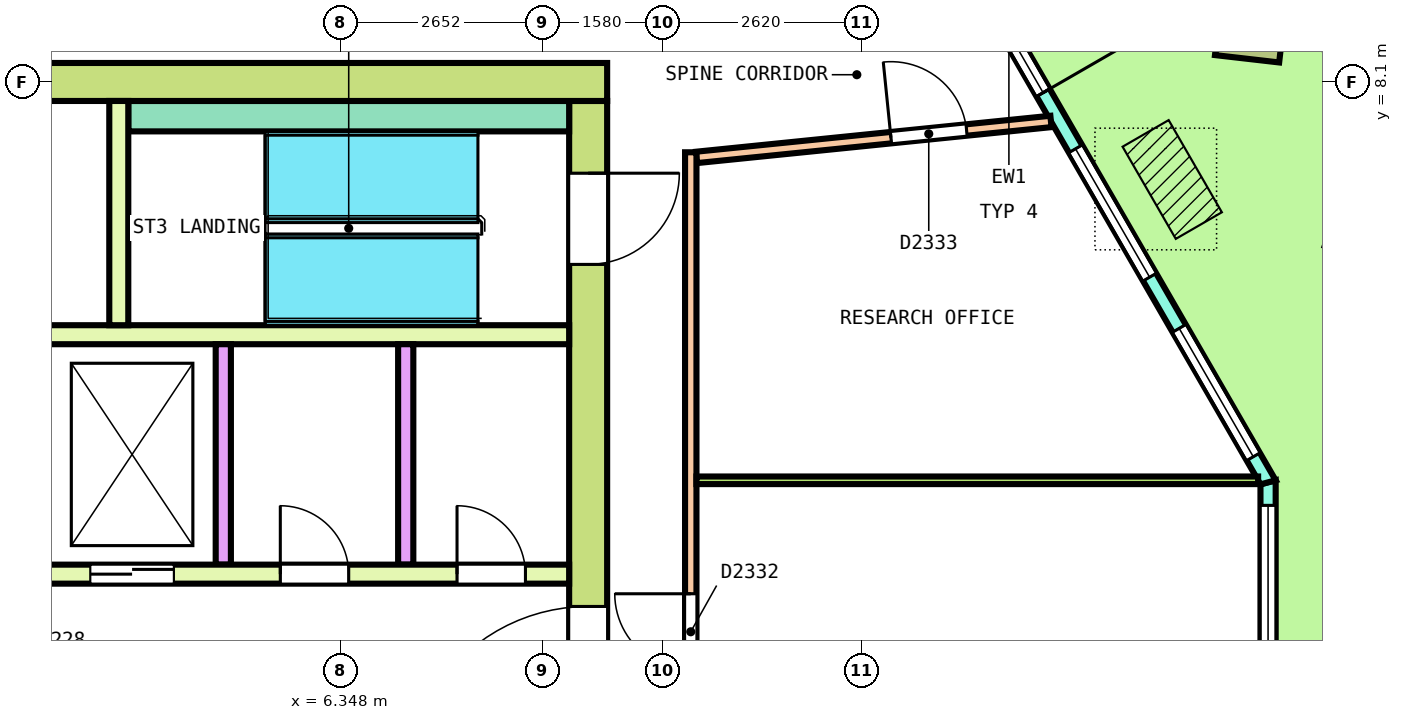
"""IFC4 building model, lengths in metres.
Left out: names, types, materials, properties, quantities, classifications, styles, units other than length and angle.
Written with IfcOpenShell. Run it as: python <this file> out.ifc"""

import sys

from ifc_helpers import new_model, si_unit, direction, frame, frame_2d, origin, origin_2d, place, context, subcontext, project, spatial, polyline, rectangle, outline, extrude, element, fill, save


model = new_model("IFC4")
c1 = context("Model", 3, precision=1e-05, world=origin(), true_north=direction((0.0, 1.0)))
c2 = subcontext(c1, "Body", "Model", "MODEL_VIEW")
j1 = project(units=[si_unit("LENGTHUNIT", "METRE"), si_unit("PLANEANGLEUNIT", "RADIAN")], contexts=[c1])
p1 = place(None, origin())
s1 = spatial("IfcSite", under=j1, at=p1, CompositionType="ELEMENT")
p2 = place(p1, origin())
s2 = spatial("IfcBuilding", under=s1, at=p2, CompositionType="ELEMENT")
p3 = place(p2, frame((0.0, 0.0, 320.6)))
s3 = spatial("IfcBuildingStorey", under=s2, at=p3, CompositionType="ELEMENT", Elevation=320.6)
p4 = place(p3, frame((19.831, 6.205, 0.0), z_axis=(0.021793949015, 0.025136579231, 0.999446434868), x_axis=(-0.499665408411, 0.866150057728, -0.010888394553)))
e1 = element("IfcColumn", 1, at=p4, inside=s3, PredefinedType="COLUMN", context=c2, shape_type="SweptSolid", body=[
    extrude(rectangle(XDim=0.85, YDim=0.85, at=origin_2d()), origin(), (0.0, 0.0, 1.0), 3.652),
])
p5 = place(p3, frame((18.317, 8.827, 0.0), z_axis=(0.025405336763, 0.018853434124, 0.999499433159), x_axis=(-0.500491745159, 0.865733787207, -0.003608699989)))
e2 = element("IfcColumn", 2, at=p5, inside=s3, PredefinedType="COLUMN", context=c2, shape_type="SweptSolid", body=[
    extrude(rectangle(XDim=0.85, YDim=0.85, at=origin_2d()), origin(), (0.0, 0.0, 1.0), 3.652),
])
p6 = place(p3, frame((18.545, -2.079, 0.0), z_axis=(0.0, 0.0, 1.0), x_axis=(0.0, 1.0, 0.0)))
e3 = element("IfcWall", 3, at=p6, inside=s3, PredefinedType="SOLIDWALL", context=c2, shape_type="SweptSolid", body=[
    extrude(outline(polyline([(-0.027, -0.1), (1.214, -0.1), (2.456, -0.1), (3.697, -0.1), (4.938, -0.1), (4.885, 0.1), (3.67, 0.1), (2.456, 0.1), (1.241, 0.1), (0.027, 0.1), (-0.027, -0.1)])), origin(), (0.0, 0.0, 1.0), 3.7),
])
p7 = place(p6, frame((0.303, 0.0, 0.1)))
e4 = element("IfcOpeningElement", 4, at=p7, cuts=e3, PredefinedType="OPENING", context=c2, shape_type="SweptSolid", body=[
    extrude(rectangle(XDim=1.85, YDim=2.9, at=frame_2d((0.925, 1.45))), frame((0.0, 0.11, 0.0), z_axis=(0.0, -1.0, 0.0), x_axis=(1.0, 0.0, 0.0)), (0.0, 0.0, 1.0), 0.22),
])
p8 = place(p6, frame((2.759, 0.0, 0.1)))
e5 = element("IfcOpeningElement", 5, at=p8, cuts=e3, PredefinedType="OPENING", context=c2, shape_type="SweptSolid", body=[
    extrude(rectangle(XDim=1.85, YDim=2.9, at=frame_2d((0.925, 1.45))), frame((0.0, 0.11, 0.0), z_axis=(0.0, -1.0, 0.0), x_axis=(1.0, 0.0, 0.0)), (0.0, 0.0, 1.0), 0.22),
])
p9 = place(p3, frame((18.545, 2.833, 0.0), z_axis=(0.0, 0.0, 1.0), x_axis=(-0.49999155959, 0.866030276803, 0.0)))
e6 = element("IfcWall", 6, at=p9, inside=s3, PredefinedType="SOLIDWALL", context=c2, shape_type="SweptSolid", body=[
    extrude(outline(polyline([(-0.027, -0.1), (1.026, -0.1), (2.08, -0.1), (3.133, -0.1), (4.186, -0.1), (5.239, -0.1), (6.292, -0.1), (7.346, -0.1), (8.399, -0.1), (9.452, -0.1), (10.506, -0.1), (11.559, -0.1), (12.612, -0.1), (13.665, -0.1), (13.612, 0.1), (12.567, 0.1), (11.522, 0.1), (10.477, 0.1), (9.432, 0.1), (8.387, 0.1), (7.342, 0.1), (6.297, 0.1), (5.252, 0.1), (4.207, 0.1), (3.162, 0.1), (2.117, 0.1), (1.072, 0.1), (0.027, 0.1), (-0.027, -0.1)])), origin(), (0.0, 0.0, 1.0), 3.7),
])
p10 = place(p9, frame((0.389, 0.0, 0.1)))
e7 = element("IfcOpeningElement", 7, at=p10, cuts=e6, PredefinedType="OPENING", context=c2, shape_type="SweptSolid", body=[
    extrude(rectangle(XDim=1.95, YDim=2.9, at=frame_2d((0.975, 1.45))), frame((0.0, 0.11, 0.0), z_axis=(0.0, -1.0, 0.0), x_axis=(1.0, 0.0, 0.0)), (0.0, 0.0, 1.0), 0.22),
])
p11 = place(p9, frame((3.116, 0.0, 0.1)))
e8 = element("IfcOpeningElement", 8, at=p11, cuts=e6, PredefinedType="OPENING", context=c2, shape_type="SweptSolid", body=[
    extrude(rectangle(XDim=1.95, YDim=2.9, at=frame_2d((0.975, 1.45))), frame((0.0, 0.11, 0.0), z_axis=(0.0, -1.0, 0.0), x_axis=(1.0, 0.0, 0.0)), (0.0, 0.0, 1.0), 0.22),
])
p12 = place(p9, frame((5.919, 0.0, 0.0)))
e9 = element("IfcOpeningElement", 9, at=p12, cuts=e6, PredefinedType="OPENING", context=c2, shape_type="SweptSolid", body=[
    extrude(rectangle(XDim=1.8, YDim=2.4, at=frame_2d((0.9, 1.2))), frame((0.0, 0.11, 0.0), z_axis=(0.0, -1.0, 0.0), x_axis=(1.0, 0.0, 0.0)), (0.0, 0.0, 1.0), 0.22),
])
p13 = place(p9, frame((5.919, 0.0, 2.55)))
e10 = element("IfcOpeningElement", 10, at=p13, cuts=e6, PredefinedType="OPENING", context=c2, shape_type="SweptSolid", body=[
    extrude(rectangle(XDim=1.8, YDim=0.45, at=frame_2d((0.9, 0.225))), frame((0.0, 0.11, 0.0), z_axis=(0.0, -1.0, 0.0), x_axis=(1.0, 0.0, 0.0)), (0.0, 0.0, 1.0), 0.22),
])
p14 = place(p9, frame((8.572, 0.0, 0.1)))
e11 = element("IfcOpeningElement", 11, at=p14, cuts=e6, PredefinedType="OPENING", context=c2, shape_type="SweptSolid", body=[
    extrude(rectangle(XDim=1.95, YDim=2.9, at=frame_2d((0.975, 1.45))), frame((0.0, 0.11, 0.0), z_axis=(0.0, -1.0, 0.0), x_axis=(1.0, 0.0, 0.0)), (0.0, 0.0, 1.0), 0.22),
])
p15 = place(p9, frame((11.3, 0.0, 0.1)))
e12 = element("IfcOpeningElement", 12, at=p15, cuts=e6, PredefinedType="OPENING", context=c2, shape_type="SweptSolid", body=[
    extrude(rectangle(XDim=1.95, YDim=2.9, at=frame_2d((0.975, 1.45))), frame((0.0, 0.11, 0.0), z_axis=(0.0, -1.0, 0.0), x_axis=(1.0, 0.0, 0.0)), (0.0, 0.0, 1.0), 0.22),
])
p16 = place(p3, frame((-9.85, 8.1, 0.0), z_axis=(0.0, 0.0, 1.0), x_axis=(1.0, 0.0, 0.0)))
e13 = element("IfcWall", 13, at=p16, inside=s3, PredefinedType="SHEAR", context=c2, shape_type="SweptSolid", body=[
    extrude(rectangle(XDim=19.7, YDim=0.5, at=frame_2d((9.85, 0.0))), origin(), (0.0, 0.0, 1.0), 3.7),
])
p17 = place(p16, frame((10.775, 0.0, 0.0)))
e14 = element("IfcOpeningElement", 14, at=p17, cuts=e13, PredefinedType="OPENING", context=c2, shape_type="SweptSolid", body=[
    extrude(rectangle(XDim=1.4, YDim=2.1, at=frame_2d((0.7, 1.05))), frame((0.0, 0.26, 0.0), z_axis=(0.0, -1.0, 0.0), x_axis=(1.0, 0.0, 0.0)), (0.0, 0.0, 1.0), 0.52),
])
p18 = place(p3, frame((9.6, -7.85, 0.0), z_axis=(0.0, 0.0, 1.0), x_axis=(0.0, 1.0, 0.0)))
e15 = element("IfcWall", 15, at=p18, inside=s3, PredefinedType="SHEAR", context=c2, shape_type="SweptSolid", body=[
    extrude(rectangle(XDim=15.7, YDim=0.5, at=frame_2d((7.85, 0.0))), origin(), (0.0, 0.0, 1.0), 3.7),
])
p19 = place(p18, frame((6.65, 0.0, 0.0)))
e16 = element("IfcOpeningElement", 16, at=p19, cuts=e15, PredefinedType="OPENING", context=c2, shape_type="SweptSolid", body=[
    extrude(rectangle(XDim=2.4, YDim=2.1, at=frame_2d((1.2, 1.05))), frame((0.0, 0.26, 0.0), z_axis=(0.0, -1.0, 0.0), x_axis=(1.0, 0.0, 0.0)), (0.0, 0.0, 1.0), 0.52),
])
p20 = place(p18, frame((13.55, 0.0, 0.0)))
e17 = element("IfcOpeningElement", 17, at=p20, cuts=e15, PredefinedType="OPENING", context=c2, shape_type="SweptSolid", body=[
    extrude(rectangle(XDim=1.2, YDim=2.1, at=frame_2d((0.6, 1.05))), frame((0.0, 0.26, 0.0), z_axis=(0.0, -1.0, 0.0), x_axis=(1.0, 0.0, 0.0)), (0.0, 0.0, 1.0), 0.52),
])
p21 = place(p18, frame((1.05, 0.0, 0.0)))
e18 = element("IfcOpeningElement", 18, at=p21, cuts=e15, PredefinedType="OPENING", context=c2, shape_type="SweptSolid", body=[
    extrude(rectangle(XDim=1.0, YDim=2.1, at=frame_2d((0.5, 1.05))), frame((0.0, 0.26, 0.0), z_axis=(0.0, -1.0, 0.0), x_axis=(1.0, 0.0, 0.0)), (0.0, 0.0, 1.0), 0.52),
])
p22 = place(p3, frame((-9.35, 1.625, 0.0), z_axis=(0.0, 0.0, 1.0), x_axis=(1.0, 0.0, 0.0)))
e19 = element("IfcWall", 19, at=p22, inside=s3, PredefinedType="SOLIDWALL", context=c2, shape_type="SweptSolid", body=[
    extrude(rectangle(XDim=18.7, YDim=0.25, at=frame_2d((9.35, 0.0))), origin(), (0.0, 0.0, 1.0), 3.7),
])
p23 = place(p22, frame((7.65, 0.0, 0.0)))
e20 = element("IfcOpeningElement", 20, at=p23, cuts=e19, PredefinedType="OPENING", context=c2, shape_type="SweptSolid", body=[
    extrude(rectangle(XDim=1.1, YDim=2.1, at=frame_2d((0.55, 1.05))), frame((0.0, 0.135, 0.0), z_axis=(0.0, -1.0, 0.0), x_axis=(1.0, 0.0, 0.0)), (0.0, 0.0, 1.0), 0.27),
])
p24 = place(p22, frame((9.95, 0.0, 0.0)))
e21 = element("IfcOpeningElement", 21, at=p24, cuts=e19, PredefinedType="OPENING", context=c2, shape_type="SweptSolid", body=[
    extrude(rectangle(XDim=1.1, YDim=2.1, at=frame_2d((0.55, 1.05))), frame((0.0, 0.135, 0.0), z_axis=(0.0, -1.0, 0.0), x_axis=(1.0, 0.0, 0.0)), (0.0, 0.0, 1.0), 0.27),
])
p25 = place(p22, frame((12.4, 0.0, 0.0)))
e22 = element("IfcOpeningElement", 22, at=p25, cuts=e19, PredefinedType="OPENING", context=c2, shape_type="SweptSolid", body=[
    extrude(rectangle(XDim=1.1, YDim=2.1, at=frame_2d((0.55, 1.05))), frame((0.0, 0.135, 0.0), z_axis=(0.0, -1.0, 0.0), x_axis=(1.0, 0.0, 0.0)), (0.0, 0.0, 1.0), 0.27),
])
p26 = place(p22, frame((0.575, 0.0, 0.0)))
e23 = element("IfcOpeningElement", 23, at=p26, cuts=e19, PredefinedType="OPENING", context=c2, shape_type="SweptSolid", body=[
    extrude(rectangle(XDim=0.9, YDim=2.1, at=frame_2d((0.45, 1.05))), frame((0.0, 0.135, 0.0), z_axis=(0.0, -1.0, 0.0), x_axis=(1.0, 0.0, 0.0)), (0.0, 0.0, 1.0), 0.27),
])
p27 = place(p22, frame((2.919, 0.0, 0.0)))
e24 = element("IfcOpeningElement", 24, at=p27, cuts=e19, PredefinedType="OPENING", context=c2, shape_type="SweptSolid", body=[
    extrude(rectangle(XDim=0.9, YDim=2.1, at=frame_2d((0.45, 1.05))), frame((0.0, 0.135, 0.0), z_axis=(0.0, -1.0, 0.0), x_axis=(1.0, 0.0, 0.0)), (0.0, 0.0, 1.0), 0.27),
])
p28 = place(p22, frame((5.281, 0.0, 0.0)))
e25 = element("IfcOpeningElement", 25, at=p28, cuts=e19, PredefinedType="OPENING", context=c2, shape_type="SweptSolid", body=[
    extrude(rectangle(XDim=0.9, YDim=2.1, at=frame_2d((0.45, 1.05))), frame((0.0, 0.135, 0.0), z_axis=(0.0, -1.0, 0.0), x_axis=(1.0, 0.0, 0.0)), (0.0, 0.0, 1.0), 0.27),
])
p29 = place(p22, frame((14.9, 0.0, 0.0)))
e26 = element("IfcOpeningElement", 26, at=p29, cuts=e19, PredefinedType="OPENING", context=c2, shape_type="SweptSolid", body=[
    extrude(rectangle(XDim=0.9, YDim=2.1, at=frame_2d((0.45, 1.05))), frame((0.0, 0.135, 0.0), z_axis=(0.0, -1.0, 0.0), x_axis=(1.0, 0.0, 0.0)), (0.0, 0.0, 1.0), 0.27),
])
p30 = place(p22, frame((17.225, 0.0, 0.0)))
e27 = element("IfcOpeningElement", 27, at=p30, cuts=e19, PredefinedType="OPENING", context=c2, shape_type="SweptSolid", body=[
    extrude(rectangle(XDim=0.9, YDim=2.1, at=frame_2d((0.45, 1.05))), frame((0.0, 0.135, 0.0), z_axis=(0.0, -1.0, 0.0), x_axis=(1.0, 0.0, 0.0)), (0.0, 0.0, 1.0), 0.27),
])
p31 = place(p3, frame((-9.35, 4.775, 0.0), z_axis=(0.0, 0.0, 1.0), x_axis=(1.0, 0.0, 0.0)))
e28 = element("IfcWall", 28, at=p31, inside=s3, PredefinedType="SOLIDWALL", context=c2, shape_type="SweptSolid", body=[
    extrude(rectangle(XDim=18.7, YDim=0.25, at=frame_2d((9.35, 0.0))), origin(), (0.0, 0.0, 1.0), 3.7),
])
for number, where, z_axis, x_axis in (
    (29, (4.8, 1.75, 0.0), (0.0, 0.0, 1.0), (0.0, 1.0, 0.0)),
    (30, (7.2, 1.75, 0.0), (0.0, 0.0, 1.0), (0.0, 1.0, 0.0)),
):
    element("IfcWall", number, at=place(p3, frame(where, z_axis=z_axis, x_axis=x_axis)), inside=s3, PredefinedType="SOLIDWALL", context=c2, shape_type="SweptSolid", body=[
        extrude(rectangle(XDim=2.9, YDim=0.2, at=frame_2d((1.45, 0.0))), origin(), (0.0, 0.0, 1.0), 3.7),
    ])
p32 = place(p3, frame((3.55, 7.65, 0.0), z_axis=(0.0, 0.0, 1.0), x_axis=(1.0, 0.0, 0.0)))
e31 = element("IfcWall", 31, at=p32, inside=s3, PredefinedType="SOLIDWALL", context=c2, shape_type="SweptSolid", body=[
    extrude(rectangle(XDim=5.8, YDim=0.4, at=frame_2d((2.9, 0.0))), origin(), (0.0, 0.0, 1.0), 3.7),
])
p33 = place(p3, frame((3.425, 4.9, 0.0), z_axis=(0.0, 0.0, 1.0), x_axis=(0.0, 1.0, 0.0)))
e32 = element("IfcWall", 32, at=p33, inside=s3, PredefinedType="SOLIDWALL", context=c2, shape_type="SweptSolid", body=[
    extrude(rectangle(XDim=2.95, YDim=0.25, at=frame_2d((1.475, 0.0))), origin(), (0.0, 0.0, 1.0), 3.7),
])
p34 = place(p3, frame((11.025, 7.108, 0.0), z_axis=(0.0, 0.0, 1.0), x_axis=(0.99489386098, 0.100926732756, 0.0)))
e33 = element("IfcWall", 33, at=p34, inside=s3, PredefinedType="PARTITIONING", context=c2, shape_type="SweptSolid", body=[
    extrude(rectangle(XDim=4.688, YDim=0.15, at=frame_2d((2.344, 0.0))), origin(), (0.0, 0.0, 1.0), 3.05),
])
p35 = place(p34, frame((2.572, 0.0, 0.0)))
e34 = element("IfcOpeningElement", 34, at=p35, cuts=e33, PredefinedType="OPENING", context=c2, shape_type="SweptSolid", body=[
    extrude(rectangle(XDim=1.0, YDim=2.1, at=frame_2d((0.5, 1.05))), frame((0.0, 0.085, 0.0), z_axis=(0.0, -1.0, 0.0), x_axis=(1.0, 0.0, 0.0)), (0.0, 0.0, 1.0), 0.17),
])
p36 = place(p3, frame((10.95, -9.975, 0.0), z_axis=(0.0, 0.0, 1.0), x_axis=(0.0, 1.0, 0.0)))
e35 = element("IfcWall", 35, at=p36, inside=s3, PredefinedType="PARTITIONING", context=c2, shape_type="SweptSolid", body=[
    extrude(rectangle(XDim=17.15, YDim=0.15, at=frame_2d((8.575, 0.0))), origin(), (0.0, 0.0, 1.0), 3.05),
])
p37 = place(p36, frame((10.342, 0.0, 0.0)))
e36 = element("IfcOpeningElement", 36, at=p37, cuts=e35, PredefinedType="OPENING", context=c2, shape_type="SweptSolid", body=[
    extrude(rectangle(XDim=1.0, YDim=2.1, at=frame_2d((0.5, 1.05))), frame((0.0, 0.085, 0.0), z_axis=(0.0, -1.0, 0.0), x_axis=(1.0, 0.0, 0.0)), (0.0, 0.0, 1.0), 0.17),
])
p38 = place(p36, frame((3.01, 0.0, 0.0)))
e37 = element("IfcOpeningElement", 37, at=p38, cuts=e35, PredefinedType="OPENING", context=c2, shape_type="SweptSolid", body=[
    extrude(rectangle(XDim=1.0, YDim=2.1, at=frame_2d((0.5, 1.05))), frame((0.0, 0.085, 0.0), z_axis=(0.0, -1.0, 0.0), x_axis=(1.0, 0.0, 0.0)), (0.0, 0.0, 1.0), 0.17),
])
p39 = place(p36, frame((6.205, 0.0, 0.0)))
e38 = element("IfcOpeningElement", 38, at=p39, cuts=e35, PredefinedType="OPENING", context=c2, shape_type="SweptSolid", body=[
    extrude(rectangle(XDim=1.0, YDim=2.1, at=frame_2d((0.5, 1.05))), frame((0.0, 0.085, 0.0), z_axis=(0.0, -1.0, 0.0), x_axis=(1.0, 0.0, 0.0)), (0.0, 0.0, 1.0), 0.17),
])
p40 = place(p3, frame((11.025, 2.86, 0.0), z_axis=(0.0, 0.0, 1.0), x_axis=(1.0, 0.0, 0.0)))
e39 = element("IfcWall", 39, at=p40, inside=s3, PredefinedType="PARTITIONING", context=c2, shape_type="SweptSolid", body=[
    extrude(rectangle(XDim=7.389, YDim=0.1, at=frame_2d((3.695, 0.0))), origin(), (0.0, 0.0, 1.0), 3.05),
])
p41 = place(p8, origin())
e40 = element("IfcWindow", 40, at=p41, inside=s3, PartitioningType="SINGLE_PANEL", PredefinedType="WINDOW", context=c2, shape_type="SweptSolid", body=[
    extrude(rectangle(XDim=1.85, YDim=2.9, at=frame_2d((0.925, 1.45))), frame((0.0, 0.03, 0.0), z_axis=(0.0, -1.0, 0.0), x_axis=(1.0, 0.0, 0.0)), (0.0, 0.0, 1.0), 0.06),
])
fill(e5, e40)
p42 = place(p10, origin())
e41 = element("IfcWindow", 41, at=p42, inside=s3, PartitioningType="SINGLE_PANEL", PredefinedType="WINDOW", context=c2, shape_type="SweptSolid", body=[
    extrude(rectangle(XDim=1.95, YDim=2.9, at=frame_2d((0.975, 1.45))), frame((0.0, 0.03, 0.0), z_axis=(0.0, -1.0, 0.0), x_axis=(1.0, 0.0, 0.0)), (0.0, 0.0, 1.0), 0.06),
])
fill(e7, e41)
p43 = place(p11, origin())
e42 = element("IfcWindow", 42, at=p43, inside=s3, PartitioningType="SINGLE_PANEL", PredefinedType="WINDOW", context=c2, shape_type="SweptSolid", body=[
    extrude(rectangle(XDim=1.95, YDim=2.9, at=frame_2d((0.975, 1.45))), frame((0.0, 0.03, 0.0), z_axis=(0.0, -1.0, 0.0), x_axis=(1.0, 0.0, 0.0)), (0.0, 0.0, 1.0), 0.06),
])
fill(e8, e42)
p44 = place(p12, origin())
e43 = element("IfcDoor", 43, at=p44, inside=s3, OperationType="DOUBLE_DOOR_SINGLE_SWING", PredefinedType="DOOR", context=c2, shape_type="SweptSolid", body=[
    extrude(rectangle(XDim=1.8, YDim=2.4, at=frame_2d((0.9, 1.2))), frame((0.0, 0.025, 0.0), z_axis=(0.0, -1.0, 0.0), x_axis=(1.0, 0.0, 0.0)), (0.0, 0.0, 1.0), 0.05),
])
fill(e9, e43)
p45 = place(p13, origin())
e44 = element("IfcWindow", 44, at=p45, inside=s3, PartitioningType="SINGLE_PANEL", PredefinedType="WINDOW", context=c2, shape_type="SweptSolid", body=[
    extrude(rectangle(XDim=1.8, YDim=0.45, at=frame_2d((0.9, 0.225))), frame((0.0, 0.03, 0.0), z_axis=(0.0, -1.0, 0.0), x_axis=(1.0, 0.0, 0.0)), (0.0, 0.0, 1.0), 0.06),
])
fill(e10, e44)
p46 = place(p25, origin())
e45 = element("IfcDoor", 45, at=p46, inside=s3, OperationType="DOUBLE_DOOR_SLIDING", PredefinedType="DOOR", context=c2, shape_type="SweptSolid", body=[
    extrude(rectangle(XDim=1.1, YDim=2.1, at=frame_2d((0.55, 1.05))), frame((0.0, 0.075, 0.0), z_axis=(0.0, -1.0, 0.0), x_axis=(1.0, 0.0, 0.0)), (0.0, 0.0, 1.0), 0.15),
])
fill(e22, e45)
p47 = place(p19, origin())
e46 = element("IfcDoor", 46, at=p47, inside=s3, OperationType="DOUBLE_DOOR_SINGLE_SWING", PredefinedType="DOOR", context=c2, shape_type="SweptSolid", body=[
    extrude(rectangle(XDim=2.4, YDim=2.1, at=frame_2d((1.2, 1.05))), frame((0.0, 0.2, 0.0), z_axis=(0.0, -1.0, 0.0), x_axis=(1.0, 0.0, 0.0)), (0.0, 0.0, 1.0), 0.4),
])
fill(e16, e46)
p48 = place(p20, origin())
e47 = element("IfcDoor", 47, at=p48, inside=s3, OperationType="SINGLE_SWING_RIGHT", PredefinedType="DOOR", context=c2, shape_type="SweptSolid", body=[
    extrude(rectangle(XDim=1.2, YDim=2.1, at=frame_2d((0.6, 1.05))), frame((0.0, 0.2, 0.0), z_axis=(0.0, -1.0, 0.0), x_axis=(1.0, 0.0, 0.0)), (0.0, 0.0, 1.0), 0.4),
])
fill(e17, e47)
p49 = place(p29, origin())
e48 = element("IfcDoor", 48, at=p49, inside=s3, OperationType="SINGLE_SWING_LEFT", PredefinedType="DOOR", context=c2, shape_type="SweptSolid", body=[
    extrude(rectangle(XDim=0.9, YDim=2.1, at=frame_2d((0.45, 1.05))), frame((0.0, 0.075, 0.0), z_axis=(0.0, -1.0, 0.0), x_axis=(1.0, 0.0, 0.0)), (0.0, 0.0, 1.0), 0.15),
])
fill(e26, e48)
p50 = place(p30, origin())
e49 = element("IfcDoor", 49, at=p50, inside=s3, OperationType="SINGLE_SWING_RIGHT", PredefinedType="DOOR", context=c2, shape_type="SweptSolid", body=[
    extrude(rectangle(XDim=0.9, YDim=2.1, at=frame_2d((0.45, 1.05))), frame((0.0, 0.075, 0.0), z_axis=(0.0, -1.0, 0.0), x_axis=(1.0, 0.0, 0.0)), (0.0, 0.0, 1.0), 0.15),
])
fill(e27, e49)
p51 = place(p37, origin())
e50 = element("IfcDoor", 50, at=p51, inside=s3, OperationType="SINGLE_SWING_RIGHT", PredefinedType="DOOR", context=c2, shape_type="SweptSolid", body=[
    extrude(rectangle(XDim=1.0, YDim=2.1, at=frame_2d((0.5, 1.05))), frame((0.0, 0.025, 0.0), z_axis=(0.0, -1.0, 0.0), x_axis=(1.0, 0.0, 0.0)), (0.0, 0.0, 1.0), 0.05),
])
fill(e36, e50)
p52 = place(p35, origin())
e51 = element("IfcDoor", 51, at=p52, inside=s3, OperationType="SINGLE_SWING_RIGHT", PredefinedType="DOOR", context=c2, shape_type="SweptSolid", body=[
    extrude(rectangle(XDim=1.0, YDim=2.1, at=frame_2d((0.5, 1.05))), frame((0.0, 0.025, 0.0), z_axis=(0.0, -1.0, 0.0), x_axis=(1.0, 0.0, 0.0)), (0.0, 0.0, 1.0), 0.05),
])
fill(e34, e51)
save(model, sys.argv[1])
